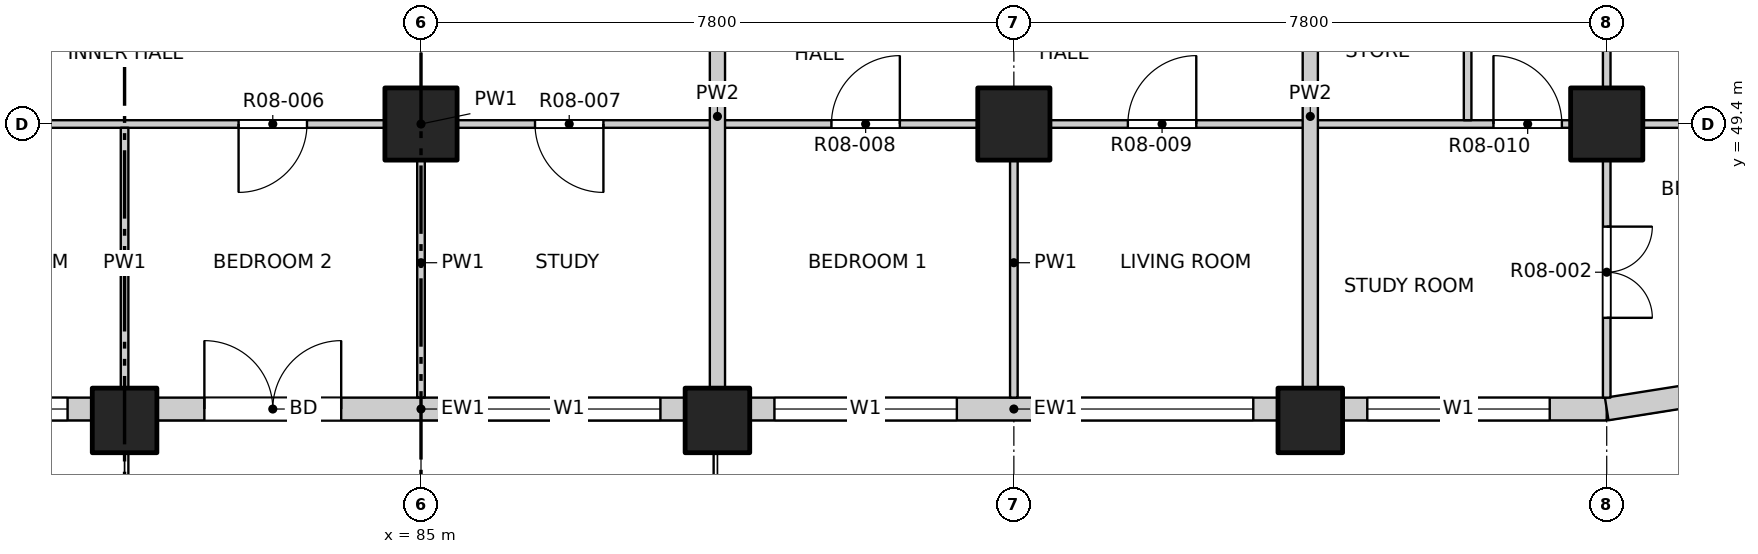
"""IFC4 building model, lengths in metres.
Left out: names, types, materials, properties, quantities, classifications, styles, units other than length and angle.
Written with IfcOpenShell. Run it as: python <this file> out.ifc"""

import sys

from ifc_helpers import new_model, si_unit, direction, frame, frame_2d, origin, origin_2d, place, context, subcontext, project, spatial, rectangle, extrude, element, fill, save


model = new_model("IFC4")
c1 = context("Model", 3, precision=1e-05, world=origin(), true_north=direction((0.0, 1.0)))
c2 = subcontext(c1, "Body", "Model", "MODEL_VIEW")
j1 = project(units=[si_unit("LENGTHUNIT", "METRE"), si_unit("PLANEANGLEUNIT", "RADIAN")], contexts=[c1])
p1 = place(None, origin())
s1 = spatial("IfcSite", under=j1, at=p1, CompositionType="ELEMENT")
p2 = place(p1, origin())
s2 = spatial("IfcBuilding", under=s1, at=p2, CompositionType="ELEMENT")
p3 = place(p2, frame((0.0, 0.0, 99.9)))
s3 = spatial("IfcBuildingStorey", under=s2, at=p3, CompositionType="ELEMENT", Elevation=99.9)
for number, where, z_axis, x_axis in (
    (1, (81.1, 45.5, -0.3), (0.0, 0.0, 1.0), (1.0, 0.0, 0.0)),
    (2, (88.9, 45.5, -0.3), (0.0, 0.0, 1.0), (1.0, 0.0, 0.0)),
    (3, (96.7, 45.5, -0.3), (0.0, 0.0, 1.0), (1.0, 0.0, 0.0)),
):
    element("IfcColumn", number, at=place(p3, frame(where, z_axis=z_axis, x_axis=x_axis)), inside=s3, PredefinedType="COLUMN", context=c2, shape_type="SweptSolid", body=[
        extrude(rectangle(XDim=0.85, YDim=0.85, at=origin_2d()), origin(), (0.0, 0.0, 1.0), 3.45),
    ])
for number, where, z_axis, x_axis in (
    (4, (85.0, 49.4, -0.3), (0.0, 0.0, 1.0), (1.0, 0.0, 0.0)),
    (5, (92.8, 49.4, -0.3), (0.0, 0.0, 1.0), (1.0, 0.0, 0.0)),
    (6, (100.6, 49.4, -0.3), (0.0, 0.0, 1.0), (1.0, 0.0, 0.0)),
):
    element("IfcColumn", number, at=place(p3, frame(where, z_axis=z_axis, x_axis=x_axis)), inside=s3, PredefinedType="COLUMN", context=c2, shape_type="SweptSolid", body=[
        extrude(rectangle(XDim=0.95, YDim=0.95, at=origin_2d()), origin(), (0.0, 0.0, 1.0), 3.45),
    ])
p4 = place(p3, frame((73.725, 45.65, 0.0), z_axis=(0.0, 0.0, 1.0), x_axis=(1.0, 0.0, 0.0)))
e7 = element("IfcWall", 7, at=p4, inside=s3, PredefinedType="SOLIDWALL", context=c2, shape_type="SweptSolid", body=[
    extrude(rectangle(XDim=6.95, YDim=0.3, at=frame_2d((3.475, 0.0))), origin(), (0.0, 0.0, 1.0), 2.7),
])
p5 = place(p4, frame((0.325, 0.0, 0.9)))
e8 = element("IfcOpeningElement", 8, at=p5, cuts=e7, PredefinedType="OPENING", context=c2, shape_type="SweptSolid", body=[
    extrude(rectangle(XDim=2.4, YDim=1.8, at=frame_2d((1.2, 0.9))), frame((0.0, 0.16, 0.0), z_axis=(0.0, -1.0, 0.0), x_axis=(1.0, 0.0, 0.0)), (0.0, 0.0, 1.0), 0.32),
])
p6 = place(p4, frame((4.225, 0.0, 0.9)))
e9 = element("IfcOpeningElement", 9, at=p6, cuts=e7, PredefinedType="OPENING", context=c2, shape_type="SweptSolid", body=[
    extrude(rectangle(XDim=2.4, YDim=1.8, at=frame_2d((1.2, 0.9))), frame((0.0, 0.16, 0.0), z_axis=(0.0, -1.0, 0.0), x_axis=(1.0, 0.0, 0.0)), (0.0, 0.0, 1.0), 0.32),
])
p7 = place(p3, frame((81.525, 45.65, 0.0), z_axis=(0.0, 0.0, 1.0), x_axis=(1.0, 0.0, 0.0)))
e10 = element("IfcWall", 10, at=p7, inside=s3, PredefinedType="SOLIDWALL", context=c2, shape_type="SweptSolid", body=[
    extrude(rectangle(XDim=6.95, YDim=0.3, at=frame_2d((3.475, 0.0))), origin(), (0.0, 0.0, 1.0), 2.7),
])
p8 = place(p7, frame((0.625, 0.0, 0.0)))
e11 = element("IfcOpeningElement", 11, at=p8, cuts=e10, PredefinedType="OPENING", context=c2, shape_type="SweptSolid", body=[
    extrude(rectangle(XDim=1.8, YDim=2.4, at=frame_2d((0.9, 1.2))), frame((0.0, 0.16, 0.0), z_axis=(0.0, -1.0, 0.0), x_axis=(1.0, 0.0, 0.0)), (0.0, 0.0, 1.0), 0.32),
])
p9 = place(p7, frame((4.225, 0.0, 0.9)))
e12 = element("IfcOpeningElement", 12, at=p9, cuts=e10, PredefinedType="OPENING", context=c2, shape_type="SweptSolid", body=[
    extrude(rectangle(XDim=2.4, YDim=1.8, at=frame_2d((1.2, 0.9))), frame((0.0, 0.16, 0.0), z_axis=(0.0, -1.0, 0.0), x_axis=(1.0, 0.0, 0.0)), (0.0, 0.0, 1.0), 0.32),
])
p10 = place(p3, frame((89.325, 45.65, 0.0), z_axis=(0.0, 0.0, 1.0), x_axis=(1.0, 0.0, 0.0)))
e13 = element("IfcWall", 13, at=p10, inside=s3, PredefinedType="SOLIDWALL", context=c2, shape_type="SweptSolid", body=[
    extrude(rectangle(XDim=6.95, YDim=0.3, at=frame_2d((3.475, 0.0))), origin(), (0.0, 0.0, 1.0), 2.7),
])
p11 = place(p10, frame((0.325, 0.0, 0.9)))
e14 = element("IfcOpeningElement", 14, at=p11, cuts=e13, PredefinedType="OPENING", context=c2, shape_type="SweptSolid", body=[
    extrude(rectangle(XDim=2.4, YDim=1.8, at=frame_2d((1.2, 0.9))), frame((0.0, 0.16, 0.0), z_axis=(0.0, -1.0, 0.0), x_axis=(1.0, 0.0, 0.0)), (0.0, 0.0, 1.0), 0.32),
])
p12 = place(p10, frame((4.225, 0.0, 0.9)))
e15 = element("IfcOpeningElement", 15, at=p12, cuts=e13, PredefinedType="OPENING", context=c2, shape_type="SweptSolid", body=[
    extrude(rectangle(XDim=2.4, YDim=1.8, at=frame_2d((1.2, 0.9))), frame((0.0, 0.16, 0.0), z_axis=(0.0, -1.0, 0.0), x_axis=(1.0, 0.0, 0.0)), (0.0, 0.0, 1.0), 0.32),
])
p13 = place(p3, frame((97.125, 45.65, 0.0), z_axis=(0.0, 0.0, 1.0), x_axis=(1.0, 0.0, 0.0)))
e16 = element("IfcWall", 16, at=p13, inside=s3, PredefinedType="SOLIDWALL", context=c2, shape_type="SweptSolid", body=[
    extrude(rectangle(XDim=3.475, YDim=0.3, at=frame_2d((1.738, 0.0))), origin(), (0.0, 0.0, 1.0), 2.7),
])
p14 = place(p13, frame((0.325, 0.0, 0.9)))
e17 = element("IfcOpeningElement", 17, at=p14, cuts=e16, PredefinedType="OPENING", context=c2, shape_type="SweptSolid", body=[
    extrude(rectangle(XDim=2.4, YDim=1.8, at=frame_2d((1.2, 0.9))), frame((0.0, 0.16, 0.0), z_axis=(0.0, -1.0, 0.0), x_axis=(1.0, 0.0, 0.0)), (0.0, 0.0, 1.0), 0.32),
])
p15 = place(p3, frame((100.6, 45.65, 0.0), z_axis=(0.0, 0.0, 1.0), x_axis=(0.987678452879, 0.156496880861, 0.0)))
e18 = element("IfcWall", 18, at=p15, inside=s3, PredefinedType="SOLIDWALL", context=c2, shape_type="SweptSolid", body=[
    extrude(rectangle(XDim=1.173, YDim=0.3, at=frame_2d((0.586, 0.0))), origin(), (0.0, 0.0, 1.0), 2.7),
])
p16 = place(p3, frame((65.8, 49.4, 0.0), z_axis=(0.0, 0.0, 1.0), x_axis=(1.0, 0.0, 0.0)))
e19 = element("IfcWall", 19, at=p16, inside=s3, PredefinedType="PARTITIONING", context=c2, shape_type="SweptSolid", body=[
    extrude(rectangle(XDim=38.4, YDim=0.1, at=frame_2d((19.2, 0.0))), origin(), (0.0, 0.0, 1.0), 3.15),
])
p17 = place(p16, frame((4.19, 0.0, 0.0)))
e20 = element("IfcOpeningElement", 20, at=p17, cuts=e19, PredefinedType="OPENING", context=c2, shape_type="SweptSolid", body=[
    extrude(rectangle(XDim=0.9, YDim=2.1, at=frame_2d((0.45, 1.05))), frame((0.0, 0.06, 0.0), z_axis=(0.0, -1.0, 0.0), x_axis=(1.0, 0.0, 0.0)), (0.0, 0.0, 1.0), 0.12),
])
p18 = place(p16, frame((9.0, 0.0, 0.0)))
e21 = element("IfcOpeningElement", 21, at=p18, cuts=e19, PredefinedType="OPENING", context=c2, shape_type="SweptSolid", body=[
    extrude(rectangle(XDim=0.9, YDim=2.1, at=frame_2d((0.45, 1.05))), frame((0.0, 0.06, 0.0), z_axis=(0.0, -1.0, 0.0), x_axis=(1.0, 0.0, 0.0)), (0.0, 0.0, 1.0), 0.12),
])
p19 = place(p16, frame((12.9, 0.0, 0.0)))
e22 = element("IfcOpeningElement", 22, at=p19, cuts=e19, PredefinedType="OPENING", context=c2, shape_type="SweptSolid", body=[
    extrude(rectangle(XDim=0.9, YDim=2.1, at=frame_2d((0.45, 1.05))), frame((0.0, 0.06, 0.0), z_axis=(0.0, -1.0, 0.0), x_axis=(1.0, 0.0, 0.0)), (0.0, 0.0, 1.0), 0.12),
])
p20 = place(p16, frame((16.8, 0.0, 0.0)))
e23 = element("IfcOpeningElement", 23, at=p20, cuts=e19, PredefinedType="OPENING", context=c2, shape_type="SweptSolid", body=[
    extrude(rectangle(XDim=0.9, YDim=2.1, at=frame_2d((0.45, 1.05))), frame((0.0, 0.06, 0.0), z_axis=(0.0, -1.0, 0.0), x_axis=(1.0, 0.0, 0.0)), (0.0, 0.0, 1.0), 0.12),
])
p21 = place(p16, frame((20.7, 0.0, 0.0)))
e24 = element("IfcOpeningElement", 24, at=p21, cuts=e19, PredefinedType="OPENING", context=c2, shape_type="SweptSolid", body=[
    extrude(rectangle(XDim=0.9, YDim=2.1, at=frame_2d((0.45, 1.05))), frame((0.0, 0.06, 0.0), z_axis=(0.0, -1.0, 0.0), x_axis=(1.0, 0.0, 0.0)), (0.0, 0.0, 1.0), 0.12),
])
p22 = place(p16, frame((24.6, 0.0, 0.0)))
e25 = element("IfcOpeningElement", 25, at=p22, cuts=e19, PredefinedType="OPENING", context=c2, shape_type="SweptSolid", body=[
    extrude(rectangle(XDim=0.9, YDim=2.1, at=frame_2d((0.45, 1.05))), frame((0.0, 0.06, 0.0), z_axis=(0.0, -1.0, 0.0), x_axis=(1.0, 0.0, 0.0)), (0.0, 0.0, 1.0), 0.12),
])
p23 = place(p16, frame((28.5, 0.0, 0.0)))
e26 = element("IfcOpeningElement", 26, at=p23, cuts=e19, PredefinedType="OPENING", context=c2, shape_type="SweptSolid", body=[
    extrude(rectangle(XDim=0.9, YDim=2.1, at=frame_2d((0.45, 1.05))), frame((0.0, 0.06, 0.0), z_axis=(0.0, -1.0, 0.0), x_axis=(1.0, 0.0, 0.0)), (0.0, 0.0, 1.0), 0.12),
])
p24 = place(p16, frame((33.31, 0.0, 0.0)))
e27 = element("IfcOpeningElement", 27, at=p24, cuts=e19, PredefinedType="OPENING", context=c2, shape_type="SweptSolid", body=[
    extrude(rectangle(XDim=0.9, YDim=2.1, at=frame_2d((0.45, 1.05))), frame((0.0, 0.06, 0.0), z_axis=(0.0, -1.0, 0.0), x_axis=(1.0, 0.0, 0.0)), (0.0, 0.0, 1.0), 0.12),
])
p25 = place(p3, frame((81.1, 45.8, 0.0), z_axis=(0.0, 0.0, 1.0), x_axis=(0.0, 1.0, 0.0)))
e28 = element("IfcWall", 28, at=p25, inside=s3, PredefinedType="PARTITIONING", context=c2, shape_type="SweptSolid", body=[
    extrude(rectangle(XDim=3.55, YDim=0.1, at=frame_2d((1.775, 0.0))), origin(), (0.0, 0.0, 1.0), 2.55),
])
p26 = place(p3, frame((85.0, 45.8, 0.0), z_axis=(0.0, 0.0, 1.0), x_axis=(0.0, 1.0, 0.0)))
e29 = element("IfcWall", 29, at=p26, inside=s3, PredefinedType="PARTITIONING", context=c2, shape_type="SweptSolid", body=[
    extrude(rectangle(XDim=3.55, YDim=0.1, at=frame_2d((1.775, 0.0))), origin(), (0.0, 0.0, 1.0), 3.15),
])
p27 = place(p3, frame((88.9, 45.8, 0.0), z_axis=(0.0, 0.0, 1.0), x_axis=(0.0, 1.0, 0.0)))
e30 = element("IfcWall", 30, at=p27, inside=s3, PredefinedType="PARTITIONING", context=c2, shape_type="SweptSolid", body=[
    extrude(rectangle(XDim=7.4, YDim=0.2, at=frame_2d((3.7, 0.0))), origin(), (0.0, 0.0, 1.0), 2.55),
])
p28 = place(p3, frame((92.8, 45.8, 0.0), z_axis=(0.0, 0.0, 1.0), x_axis=(0.0, 1.0, 0.0)))
e31 = element("IfcWall", 31, at=p28, inside=s3, PredefinedType="PARTITIONING", context=c2, shape_type="SweptSolid", body=[
    extrude(rectangle(XDim=3.55, YDim=0.1, at=frame_2d((1.775, 0.0))), origin(), (0.0, 0.0, 1.0), 3.15),
])
p29 = place(p3, frame((96.7, 45.8, 0.0), z_axis=(0.0, 0.0, 1.0), x_axis=(0.0, 1.0, 0.0)))
e32 = element("IfcWall", 32, at=p29, inside=s3, PredefinedType="PARTITIONING", context=c2, shape_type="SweptSolid", body=[
    extrude(rectangle(XDim=7.4, YDim=0.2, at=frame_2d((3.7, 0.0))), origin(), (0.0, 0.0, 1.0), 3.15),
])
p30 = place(p3, frame((98.77, 49.45, 0.0), z_axis=(0.0, 0.0, 1.0), x_axis=(0.0, 1.0, 0.0)))
e33 = element("IfcWall", 33, at=p30, inside=s3, PredefinedType="PARTITIONING", context=c2, shape_type="SweptSolid", body=[
    extrude(rectangle(XDim=8.15, YDim=0.1, at=frame_2d((4.075, 0.0))), origin(), (0.0, 0.0, 1.0), 3.15),
])
p31 = place(p30, frame((1.0, 0.0, 0.0)))
e34 = element("IfcOpeningElement", 34, at=p31, cuts=e33, PredefinedType="OPENING", context=c2, shape_type="SweptSolid", body=[
    extrude(rectangle(XDim=0.8, YDim=2.1, at=frame_2d((0.4, 1.05))), frame((0.0, 0.06, 0.0), z_axis=(0.0, -1.0, 0.0), x_axis=(1.0, 0.0, 0.0)), (0.0, 0.0, 1.0), 0.12),
])
p32 = place(p30, frame((3.315, 0.0, 0.0)))
e35 = element("IfcOpeningElement", 35, at=p32, cuts=e33, PredefinedType="OPENING", context=c2, shape_type="SweptSolid", body=[
    extrude(rectangle(XDim=0.9, YDim=2.1, at=frame_2d((0.45, 1.05))), frame((0.0, 0.06, 0.0), z_axis=(0.0, -1.0, 0.0), x_axis=(1.0, 0.0, 0.0)), (0.0, 0.0, 1.0), 0.12),
])
p33 = place(p30, frame((5.99, 0.0, 0.0)))
e36 = element("IfcOpeningElement", 36, at=p33, cuts=e33, PredefinedType="OPENING", context=c2, shape_type="SweptSolid", body=[
    extrude(rectangle(XDim=0.9, YDim=2.1, at=frame_2d((0.45, 1.05))), frame((0.0, 0.06, 0.0), z_axis=(0.0, -1.0, 0.0), x_axis=(1.0, 0.0, 0.0)), (0.0, 0.0, 1.0), 0.12),
])
p34 = place(p3, frame((100.6, 45.8, 0.0), z_axis=(0.0, 0.0, 1.0), x_axis=(0.0, 1.0, 0.0)))
e37 = element("IfcWall", 37, at=p34, inside=s3, PredefinedType="PARTITIONING", context=c2, shape_type="SweptSolid", body=[
    extrude(rectangle(XDim=38.4, YDim=0.1, at=frame_2d((19.2, 0.0))), origin(), (0.0, 0.0, 1.0), 3.15),
])
p35 = place(p34, frame((1.05, 0.0, 0.0)))
e38 = element("IfcOpeningElement", 38, at=p35, cuts=e37, PredefinedType="OPENING", context=c2, shape_type="SweptSolid", body=[
    extrude(rectangle(XDim=1.2, YDim=2.1, at=frame_2d((0.6, 1.05))), frame((0.0, 0.06, 0.0), z_axis=(0.0, -1.0, 0.0), x_axis=(1.0, 0.0, 0.0)), (0.0, 0.0, 1.0), 0.12),
])
p36 = place(p34, frame((5.1, 0.0, 0.0)))
e39 = element("IfcOpeningElement", 39, at=p36, cuts=e37, PredefinedType="OPENING", context=c2, shape_type="SweptSolid", body=[
    extrude(rectangle(XDim=0.9, YDim=2.1, at=frame_2d((0.45, 1.05))), frame((0.0, 0.06, 0.0), z_axis=(0.0, -1.0, 0.0), x_axis=(1.0, 0.0, 0.0)), (0.0, 0.0, 1.0), 0.12),
])
p37 = place(p34, frame((9.0, 0.0, 0.0)))
e40 = element("IfcOpeningElement", 40, at=p37, cuts=e37, PredefinedType="OPENING", context=c2, shape_type="SweptSolid", body=[
    extrude(rectangle(XDim=0.9, YDim=2.1, at=frame_2d((0.45, 1.05))), frame((0.0, 0.06, 0.0), z_axis=(0.0, -1.0, 0.0), x_axis=(1.0, 0.0, 0.0)), (0.0, 0.0, 1.0), 0.12),
])
p38 = place(p34, frame((12.9, 0.0, 0.0)))
e41 = element("IfcOpeningElement", 41, at=p38, cuts=e37, PredefinedType="OPENING", context=c2, shape_type="SweptSolid", body=[
    extrude(rectangle(XDim=0.9, YDim=2.1, at=frame_2d((0.45, 1.05))), frame((0.0, 0.06, 0.0), z_axis=(0.0, -1.0, 0.0), x_axis=(1.0, 0.0, 0.0)), (0.0, 0.0, 1.0), 0.12),
])
p39 = place(p34, frame((16.8, 0.0, 0.0)))
e42 = element("IfcOpeningElement", 42, at=p39, cuts=e37, PredefinedType="OPENING", context=c2, shape_type="SweptSolid", body=[
    extrude(rectangle(XDim=0.9, YDim=2.1, at=frame_2d((0.45, 1.05))), frame((0.0, 0.06, 0.0), z_axis=(0.0, -1.0, 0.0), x_axis=(1.0, 0.0, 0.0)), (0.0, 0.0, 1.0), 0.12),
])
p40 = place(p34, frame((20.7, 0.0, 0.0)))
e43 = element("IfcOpeningElement", 43, at=p40, cuts=e37, PredefinedType="OPENING", context=c2, shape_type="SweptSolid", body=[
    extrude(rectangle(XDim=0.9, YDim=2.1, at=frame_2d((0.45, 1.05))), frame((0.0, 0.06, 0.0), z_axis=(0.0, -1.0, 0.0), x_axis=(1.0, 0.0, 0.0)), (0.0, 0.0, 1.0), 0.12),
])
p41 = place(p34, frame((24.6, 0.0, 0.0)))
e44 = element("IfcOpeningElement", 44, at=p41, cuts=e37, PredefinedType="OPENING", context=c2, shape_type="SweptSolid", body=[
    extrude(rectangle(XDim=0.9, YDim=2.1, at=frame_2d((0.45, 1.05))), frame((0.0, 0.06, 0.0), z_axis=(0.0, -1.0, 0.0), x_axis=(1.0, 0.0, 0.0)), (0.0, 0.0, 1.0), 0.12),
])
p42 = place(p34, frame((28.5, 0.0, 0.0)))
e45 = element("IfcOpeningElement", 45, at=p42, cuts=e37, PredefinedType="OPENING", context=c2, shape_type="SweptSolid", body=[
    extrude(rectangle(XDim=0.9, YDim=2.1, at=frame_2d((0.45, 1.05))), frame((0.0, 0.06, 0.0), z_axis=(0.0, -1.0, 0.0), x_axis=(1.0, 0.0, 0.0)), (0.0, 0.0, 1.0), 0.12),
])
p43 = place(p34, frame((32.4, 0.0, 0.0)))
e46 = element("IfcOpeningElement", 46, at=p43, cuts=e37, PredefinedType="OPENING", context=c2, shape_type="SweptSolid", body=[
    extrude(rectangle(XDim=0.9, YDim=2.1, at=frame_2d((0.45, 1.05))), frame((0.0, 0.06, 0.0), z_axis=(0.0, -1.0, 0.0), x_axis=(1.0, 0.0, 0.0)), (0.0, 0.0, 1.0), 0.12),
])
p44 = place(p34, frame((36.15, 0.0, 0.0)))
e47 = element("IfcOpeningElement", 47, at=p44, cuts=e37, PredefinedType="OPENING", context=c2, shape_type="SweptSolid", body=[
    extrude(rectangle(XDim=1.2, YDim=2.1, at=frame_2d((0.6, 1.05))), frame((0.0, 0.06, 0.0), z_axis=(0.0, -1.0, 0.0), x_axis=(1.0, 0.0, 0.0)), (0.0, 0.0, 1.0), 0.12),
])
p45 = place(p6, origin())
e48 = element("IfcWindow", 48, at=p45, inside=s3, PartitioningType="DOUBLE_PANEL_VERTICAL", PredefinedType="WINDOW", context=c2, shape_type="SweptSolid", body=[
    extrude(rectangle(XDim=2.4, YDim=1.8, at=frame_2d((1.2, 0.9))), frame((0.0, 0.03, 0.0), z_axis=(0.0, -1.0, 0.0), x_axis=(1.0, 0.0, 0.0)), (0.0, 0.0, 1.0), 0.06),
])
fill(e9, e48)
p46 = place(p8, origin())
e49 = element("IfcDoor", 49, at=p46, inside=s3, OperationType="DOUBLE_DOOR_SINGLE_SWING", PredefinedType="DOOR", context=c2, shape_type="SweptSolid", body=[
    extrude(rectangle(XDim=1.8, YDim=2.4, at=frame_2d((0.9, 1.2))), frame((0.0, 0.025, 0.0), z_axis=(0.0, -1.0, 0.0), x_axis=(1.0, 0.0, 0.0)), (0.0, 0.0, 1.0), 0.05),
])
fill(e11, e49)
p47 = place(p9, origin())
e50 = element("IfcWindow", 50, at=p47, inside=s3, PartitioningType="DOUBLE_PANEL_VERTICAL", PredefinedType="WINDOW", context=c2, shape_type="SweptSolid", body=[
    extrude(rectangle(XDim=2.4, YDim=1.8, at=frame_2d((1.2, 0.9))), frame((0.0, 0.03, 0.0), z_axis=(0.0, -1.0, 0.0), x_axis=(1.0, 0.0, 0.0)), (0.0, 0.0, 1.0), 0.06),
])
fill(e12, e50)
p48 = place(p11, origin())
e51 = element("IfcWindow", 51, at=p48, inside=s3, PartitioningType="DOUBLE_PANEL_VERTICAL", PredefinedType="WINDOW", context=c2, shape_type="SweptSolid", body=[
    extrude(rectangle(XDim=2.4, YDim=1.8, at=frame_2d((1.2, 0.9))), frame((0.0, 0.03, 0.0), z_axis=(0.0, -1.0, 0.0), x_axis=(1.0, 0.0, 0.0)), (0.0, 0.0, 1.0), 0.06),
])
fill(e14, e51)
p49 = place(p12, origin())
e52 = element("IfcWindow", 52, at=p49, inside=s3, PartitioningType="DOUBLE_PANEL_VERTICAL", PredefinedType="WINDOW", context=c2, shape_type="SweptSolid", body=[
    extrude(rectangle(XDim=2.4, YDim=1.8, at=frame_2d((1.2, 0.9))), frame((0.0, 0.03, 0.0), z_axis=(0.0, -1.0, 0.0), x_axis=(1.0, 0.0, 0.0)), (0.0, 0.0, 1.0), 0.06),
])
fill(e15, e52)
p50 = place(p14, origin())
e53 = element("IfcWindow", 53, at=p50, inside=s3, PartitioningType="DOUBLE_PANEL_VERTICAL", PredefinedType="WINDOW", context=c2, shape_type="SweptSolid", body=[
    extrude(rectangle(XDim=2.4, YDim=1.8, at=frame_2d((1.2, 0.9))), frame((0.0, 0.03, 0.0), z_axis=(0.0, -1.0, 0.0), x_axis=(1.0, 0.0, 0.0)), (0.0, 0.0, 1.0), 0.06),
])
fill(e17, e53)
p51 = place(p35, origin())
e54 = element("IfcDoor", 54, at=p51, inside=s3, OperationType="DOUBLE_DOOR_SINGLE_SWING", PredefinedType="DOOR", context=c2, shape_type="SweptSolid", body=[
    extrude(rectangle(XDim=1.2, YDim=2.1, at=frame_2d((0.6, 1.05))), frame((0.0, 0.025, 0.0), z_axis=(0.0, -1.0, 0.0), x_axis=(1.0, 0.0, 0.0)), (0.0, 0.0, 1.0), 0.05),
])
fill(e38, e54)
p52 = place(p20, origin())
e55 = element("IfcDoor", 55, at=p52, inside=s3, OperationType="SINGLE_SWING_RIGHT", PredefinedType="DOOR", context=c2, shape_type="SweptSolid", body=[
    extrude(rectangle(XDim=0.9, YDim=2.1, at=frame_2d((0.45, 1.05))), frame((0.0, 0.025, 0.0), z_axis=(0.0, -1.0, 0.0), x_axis=(1.0, 0.0, 0.0)), (0.0, 0.0, 1.0), 0.05),
])
fill(e23, e55)
p53 = place(p21, origin())
e56 = element("IfcDoor", 56, at=p53, inside=s3, OperationType="SINGLE_SWING_LEFT", PredefinedType="DOOR", context=c2, shape_type="SweptSolid", body=[
    extrude(rectangle(XDim=0.9, YDim=2.1, at=frame_2d((0.45, 1.05))), frame((0.0, 0.025, 0.0), z_axis=(0.0, -1.0, 0.0), x_axis=(1.0, 0.0, 0.0)), (0.0, 0.0, 1.0), 0.05),
])
fill(e24, e56)
p54 = place(p22, origin())
e57 = element("IfcDoor", 57, at=p54, inside=s3, OperationType="SINGLE_SWING_RIGHT", PredefinedType="DOOR", context=c2, shape_type="SweptSolid", body=[
    extrude(rectangle(XDim=0.9, YDim=2.1, at=frame_2d((0.45, 1.05))), frame((0.0, 0.025, 0.0), z_axis=(0.0, -1.0, 0.0), x_axis=(1.0, 0.0, 0.0)), (0.0, 0.0, 1.0), 0.05),
])
fill(e25, e57)
p55 = place(p23, origin())
e58 = element("IfcDoor", 58, at=p55, inside=s3, OperationType="SINGLE_SWING_RIGHT", PredefinedType="DOOR", context=c2, shape_type="SweptSolid", body=[
    extrude(rectangle(XDim=0.9, YDim=2.1, at=frame_2d((0.45, 1.05))), frame((0.0, 0.025, 0.0), z_axis=(0.0, -1.0, 0.0), x_axis=(1.0, 0.0, 0.0)), (0.0, 0.0, 1.0), 0.05),
])
fill(e26, e58)
p56 = place(p24, origin())
e59 = element("IfcDoor", 59, at=p56, inside=s3, OperationType="SINGLE_SWING_LEFT", PredefinedType="DOOR", context=c2, shape_type="SweptSolid", body=[
    extrude(rectangle(XDim=0.9, YDim=2.1, at=frame_2d((0.45, 1.05))), frame((0.0, 0.025, 0.0), z_axis=(0.0, -1.0, 0.0), x_axis=(1.0, 0.0, 0.0)), (0.0, 0.0, 1.0), 0.05),
])
fill(e27, e59)
save(model, sys.argv[1])
